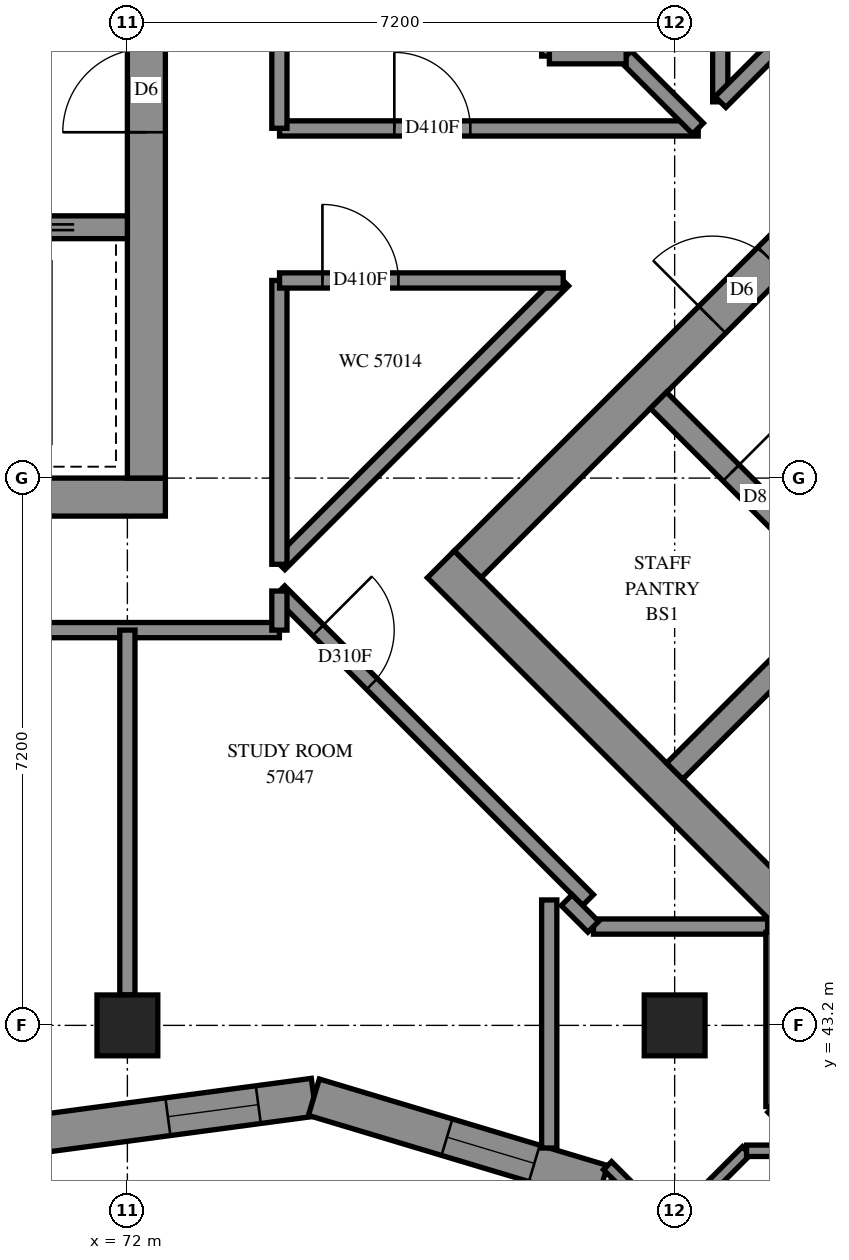
"""IFC4 building model, lengths in metres.
Left out: names, types, materials, properties, quantities, classifications, styles, units other than length and angle.
Written with IfcOpenShell. Run it as: python <this file> out.ifc"""

import sys

from ifc_helpers import new_model, si_unit, direction, frame, frame_2d, origin, origin_2d, place, context, subcontext, project, spatial, polyline, rectangle, outline, extrude, element, fill, save


model = new_model("IFC4")
c1 = context("Model", 3, precision=1e-05, world=origin(), true_north=direction((0.0, 1.0)))
c2 = subcontext(c1, "Body", "Model", "MODEL_VIEW")
j1 = project(units=[si_unit("LENGTHUNIT", "METRE"), si_unit("PLANEANGLEUNIT", "RADIAN")], contexts=[c1])
p1 = place(None, origin())
s1 = spatial("IfcSite", under=j1, at=p1, CompositionType="ELEMENT")
p2 = place(p1, origin())
s2 = spatial("IfcBuilding", under=s1, at=p2, CompositionType="ELEMENT")
p3 = place(p2, frame((0.0, 0.0, 210.0)))
s3 = spatial("IfcBuildingStorey", under=s2, at=p3, CompositionType="ELEMENT", Elevation=210.0)
for number, where, z_axis, x_axis in (
    (1, (72.0, 43.2, 0.0), (0.0, 0.0, 1.0), (1.0, 0.0, 0.0)),
    (2, (79.2, 43.2, 0.0), (0.0, 0.0, 1.0), (1.0, 0.0, 0.0)),
):
    element("IfcColumn", number, at=place(p3, frame(where, z_axis=z_axis, x_axis=x_axis)), inside=s3, PredefinedType="COLUMN", context=c2, shape_type="SweptSolid", body=[
        extrude(rectangle(XDim=0.8, YDim=0.8, at=origin_2d()), origin(), (0.0, 0.0, 1.0), 3.1),
    ])
p4 = place(p3, frame((57.1, 50.15, -0.3), z_axis=(0.0, 0.0, 1.0), x_axis=(1.0, 0.0, 0.0)))
e3 = element("IfcWall", 3, at=p4, inside=s3, PredefinedType="SHEAR", context=c2, shape_type="SweptSolid", body=[
    extrude(rectangle(XDim=15.4, YDim=0.5, at=frame_2d((7.7, 0.0))), origin(), (0.0, 0.0, 1.0), 2.7),
])
p5 = place(p3, frame((72.25, 50.4, -0.3), z_axis=(0.0, 0.0, 1.0), x_axis=(0.0, 1.0, 0.0)))
e4 = element("IfcWall", 4, at=p5, inside=s3, PredefinedType="SHEAR", context=c2, shape_type="SweptSolid", body=[
    extrude(rectangle(XDim=14.4, YDim=0.5, at=frame_2d((7.2, 0.0))), origin(), (0.0, 0.0, 1.0), 2.7),
])
p6 = place(p5, frame((4.55, 0.0, 0.3)))
e5 = element("IfcOpeningElement", 5, at=p6, cuts=e4, PredefinedType="OPENING", context=c2, shape_type="SweptSolid", body=[
    extrude(rectangle(XDim=1.1, YDim=2.1, at=frame_2d((0.55, 1.05))), frame((0.0, 0.26, 0.0), z_axis=(0.0, -1.0, 0.0), x_axis=(1.0, 0.0, 0.0)), (0.0, 0.0, 1.0), 0.52),
])
p7 = place(p5, frame((11.35, 0.0, 0.3)))
e6 = element("IfcOpeningElement", 6, at=p7, cuts=e4, PredefinedType="OPENING", context=c2, shape_type="SweptSolid", body=[
    extrude(rectangle(XDim=1.1, YDim=2.1, at=frame_2d((0.55, 1.05))), frame((0.0, 0.26, 0.0), z_axis=(0.0, -1.0, 0.0), x_axis=(1.0, 0.0, 0.0)), (0.0, 0.0, 1.0), 0.52),
])
p8 = place(p3, frame((57.6, 53.7, 0.0), z_axis=(0.0, 0.0, 1.0), x_axis=(1.0, 0.0, 0.0)))
e7 = element("IfcWall", 7, at=p8, inside=s3, PredefinedType="SOLIDWALL", context=c2, shape_type="SweptSolid", body=[
    extrude(rectangle(XDim=14.4, YDim=0.3, at=frame_2d((7.2, 0.0))), origin(), (0.0, 0.0, 1.0), 3.1),
])
p9 = place(p8, frame((1.35, 0.0, 0.0)))
e8 = element("IfcOpeningElement", 8, at=p9, cuts=e7, PredefinedType="OPENING", context=c2, shape_type="SweptSolid", body=[
    extrude(rectangle(XDim=0.9, YDim=2.1, at=frame_2d((0.45, 1.05))), frame((0.0, 0.16, 0.0), z_axis=(0.0, -1.0, 0.0), x_axis=(1.0, 0.0, 0.0)), (0.0, 0.0, 1.0), 0.32),
])
p10 = place(p8, frame((4.95, 0.0, 0.0)))
e9 = element("IfcOpeningElement", 9, at=p10, cuts=e7, PredefinedType="OPENING", context=c2, shape_type="SweptSolid", body=[
    extrude(rectangle(XDim=0.9, YDim=2.1, at=frame_2d((0.45, 1.05))), frame((0.0, 0.16, 0.0), z_axis=(0.0, -1.0, 0.0), x_axis=(1.0, 0.0, 0.0)), (0.0, 0.0, 1.0), 0.32),
])
p11 = place(p8, frame((8.55, 0.0, 0.0)))
e10 = element("IfcOpeningElement", 10, at=p11, cuts=e7, PredefinedType="OPENING", context=c2, shape_type="SweptSolid", body=[
    extrude(rectangle(XDim=0.9, YDim=2.1, at=frame_2d((0.45, 1.05))), frame((0.0, 0.16, 0.0), z_axis=(0.0, -1.0, 0.0), x_axis=(1.0, 0.0, 0.0)), (0.0, 0.0, 1.0), 0.32),
])
p12 = place(p8, frame((12.05, 0.0, 0.0)))
e11 = element("IfcOpeningElement", 11, at=p12, cuts=e7, PredefinedType="OPENING", context=c2, shape_type="SweptSolid", body=[
    extrude(rectangle(XDim=1.1, YDim=2.1, at=frame_2d((0.55, 1.05))), frame((0.0, 0.16, 0.0), z_axis=(0.0, -1.0, 0.0), x_axis=(1.0, 0.0, 0.0)), (0.0, 0.0, 1.0), 0.32),
])
p13 = place(p3, frame((76.124, 49.267, -0.3), z_axis=(0.0, 0.0, 1.0), x_axis=(0.7071067812, -0.7071067812, 0.0)))
e12 = element("IfcWall", 12, at=p13, inside=s3, PredefinedType="SHEAR", context=c2, shape_type="SweptSolid", body=[
    extrude(rectangle(XDim=15.4, YDim=0.5, at=frame_2d((7.7, 0.0))), origin(), (0.0, 0.0, 1.0), 2.7),
])
p14 = place(p3, frame((76.478, 49.267, -0.3), z_axis=(0.0, 0.0, 1.0), x_axis=(0.7071067812, 0.7071067812, 0.0)))
e13 = element("IfcWall", 13, at=p14, inside=s3, PredefinedType="SHEAR", context=c2, shape_type="SweptSolid", body=[
    extrude(rectangle(XDim=14.4, YDim=0.5, at=frame_2d((7.2, 0.0))), origin(), (0.0, 0.0, 1.0), 2.7),
])
p15 = place(p14, frame((4.55, 0.0, 0.3)))
e14 = element("IfcOpeningElement", 14, at=p15, cuts=e13, PredefinedType="OPENING", context=c2, shape_type="SweptSolid", body=[
    extrude(rectangle(XDim=1.1, YDim=2.1, at=frame_2d((0.55, 1.05))), frame((0.0, 0.26, 0.0), z_axis=(0.0, -1.0, 0.0), x_axis=(1.0, 0.0, 0.0)), (0.0, 0.0, 1.0), 0.52),
])
p16 = place(p14, frame((11.35, 0.0, 0.3)))
e15 = element("IfcOpeningElement", 15, at=p16, cuts=e13, PredefinedType="OPENING", context=c2, shape_type="SweptSolid", body=[
    extrude(rectangle(XDim=1.1, YDim=2.1, at=frame_2d((0.55, 1.05))), frame((0.0, 0.26, 0.0), z_axis=(0.0, -1.0, 0.0), x_axis=(1.0, 0.0, 0.0)), (0.0, 0.0, 1.0), 0.52),
])
p17 = place(p3, frame((79.2, 46.544, 0.0), z_axis=(0.0, 0.0, 1.0), x_axis=(0.7071219326, 0.7070916295, 0.0)))
e16 = element("IfcWall", 16, at=p17, inside=s3, PredefinedType="SOLIDWALL", context=c2, shape_type="SweptSolid", body=[
    extrude(rectangle(XDim=3.3, YDim=0.3, at=frame_2d((1.65, 0.0))), origin(), (0.0, 0.0, 1.0), 3.1),
])
p18 = place(p3, frame((78.988, 51.423, 0.0), z_axis=(0.0, 0.0, 1.0), x_axis=(0.7071067812, -0.7071067812, 0.0)))
e17 = element("IfcWall", 17, at=p18, inside=s3, PredefinedType="SOLIDWALL", context=c2, shape_type="SweptSolid", body=[
    extrude(rectangle(XDim=14.4, YDim=0.3, at=frame_2d((7.2, 0.0))), origin(), (0.0, 0.0, 1.0), 3.1),
])
p19 = place(p18, frame((1.35, 0.0, 0.0)))
e18 = element("IfcOpeningElement", 18, at=p19, cuts=e17, PredefinedType="OPENING", context=c2, shape_type="SweptSolid", body=[
    extrude(rectangle(XDim=0.9, YDim=2.1, at=frame_2d((0.45, 1.05))), frame((0.0, 0.16, 0.0), z_axis=(0.0, -1.0, 0.0), x_axis=(1.0, 0.0, 0.0)), (0.0, 0.0, 1.0), 0.32),
])
p20 = place(p18, frame((4.95, 0.0, 0.0)))
e19 = element("IfcOpeningElement", 19, at=p20, cuts=e17, PredefinedType="OPENING", context=c2, shape_type="SweptSolid", body=[
    extrude(rectangle(XDim=0.9, YDim=2.1, at=frame_2d((0.45, 1.05))), frame((0.0, 0.16, 0.0), z_axis=(0.0, -1.0, 0.0), x_axis=(1.0, 0.0, 0.0)), (0.0, 0.0, 1.0), 0.32),
])
p21 = place(p18, frame((8.55, 0.0, 0.0)))
e20 = element("IfcOpeningElement", 20, at=p21, cuts=e17, PredefinedType="OPENING", context=c2, shape_type="SweptSolid", body=[
    extrude(rectangle(XDim=0.9, YDim=2.1, at=frame_2d((0.45, 1.05))), frame((0.0, 0.16, 0.0), z_axis=(0.0, -1.0, 0.0), x_axis=(1.0, 0.0, 0.0)), (0.0, 0.0, 1.0), 0.32),
])
p22 = place(p18, frame((12.05, 0.0, 0.0)))
e21 = element("IfcOpeningElement", 21, at=p22, cuts=e17, PredefinedType="OPENING", context=c2, shape_type="SweptSolid", body=[
    extrude(rectangle(XDim=1.1, YDim=2.1, at=frame_2d((0.55, 1.05))), frame((0.0, 0.16, 0.0), z_axis=(0.0, -1.0, 0.0), x_axis=(1.0, 0.0, 0.0)), (0.0, 0.0, 1.0), 0.32),
])
p23 = place(p3, frame((70.828, 41.77, 0.0), z_axis=(0.0, 0.0, 1.0), x_axis=(0.9911788782, 0.1325308696, 0.0)))
e22 = element("IfcWall", 22, at=p23, inside=s3, PredefinedType="SOLIDWALL", context=c2, shape_type="SweptSolid", body=[
    extrude(outline(polyline([(-0.033, -0.25), (3.603, -0.25), (3.711, 0.25), (0.033, 0.25), (-0.033, -0.25)])), origin(), (0.0, 0.0, 1.0), 3.1),
])
p24 = place(p23, frame((1.72, 0.0, 0.45)))
e23 = element("IfcOpeningElement", 23, at=p24, cuts=e22, PredefinedType="OPENING", context=c2, shape_type="SweptSolid", body=[
    extrude(rectangle(XDim=1.2, YDim=2.5, at=frame_2d((0.6, 1.25))), frame((0.0, 0.26, 0.0), z_axis=(0.0, -1.0, 0.0), x_axis=(1.0, 0.0, 0.0)), (0.0, 0.0, 1.0), 0.52),
])
p25 = place(p3, frame((74.453, 42.255, 0.0), z_axis=(0.0, 0.0, 1.0), x_axis=(0.9577859598, -0.2874822693, 0.0)))
e24 = element("IfcWall", 24, at=p25, inside=s3, PredefinedType="SOLIDWALL", context=c2, shape_type="SweptSolid", body=[
    extrude(outline(polyline([(0.054, -0.25), (3.817, -0.25), (4.101, 0.25), (-0.054, 0.25), (0.054, -0.25)])), origin(), (0.0, 0.0, 1.0), 3.1),
])
p26 = place(p25, frame((1.828, 0.0, 0.45)))
e25 = element("IfcOpeningElement", 25, at=p26, cuts=e24, PredefinedType="OPENING", context=c2, shape_type="SweptSolid", body=[
    extrude(rectangle(XDim=1.2, YDim=2.5, at=frame_2d((0.6, 1.25))), frame((0.0, 0.26, 0.0), z_axis=(0.0, -1.0, 0.0), x_axis=(1.0, 0.0, 0.0)), (0.0, 0.0, 1.0), 0.52),
])
p27 = place(p3, frame((78.246, 41.117, 0.0), z_axis=(0.0, 0.0, 1.0), x_axis=(0.2436885681, -0.9698535363, 0.0)))
e26 = element("IfcWall", 26, at=p27, inside=s3, PredefinedType="SOLIDWALL", context=c2, shape_type="SweptSolid", body=[
    extrude(outline(polyline([(0.142, -0.25), (4.816, -0.25), (4.529, 0.25), (-0.142, 0.25), (0.142, -0.25)])), origin(), (0.0, 0.0, 1.0), 3.1),
])
p28 = place(p27, frame((1.947, 0.0, 0.45)))
e27 = element("IfcOpeningElement", 27, at=p28, cuts=e26, PredefinedType="OPENING", context=c2, shape_type="SweptSolid", body=[
    extrude(rectangle(XDim=1.2, YDim=2.5, at=frame_2d((0.6, 1.25))), frame((0.0, 0.26, 0.0), z_axis=(0.0, -1.0, 0.0), x_axis=(1.0, 0.0, 0.0)), (0.0, 0.0, 1.0), 0.52),
])
p29 = place(p3, frame((55.6, 48.4, 0.0), z_axis=(0.0, 0.0, 1.0), x_axis=(1.0, 0.0, 0.0)))
e28 = element("IfcWall", 28, at=p29, inside=s3, PredefinedType="PARTITIONING", context=c2, shape_type="SweptSolid", body=[
    extrude(rectangle(XDim=18.4, YDim=0.2, at=frame_2d((9.2, 0.0))), origin(), (0.0, 0.0, 1.0), 3.1),
])
p30 = place(p29, frame((5.862, 0.0, 0.0)))
e29 = element("IfcOpeningElement", 29, at=p30, cuts=e28, PredefinedType="OPENING", context=c2, shape_type="SweptSolid", body=[
    extrude(rectangle(XDim=1.0, YDim=2.1, at=frame_2d((0.5, 1.05))), frame((0.0, 0.11, 0.0), z_axis=(0.0, -1.0, 0.0), x_axis=(1.0, 0.0, 0.0)), (0.0, 0.0, 1.0), 0.22),
])
p31 = place(p29, frame((13.099, 0.0, 0.0)))
e30 = element("IfcOpeningElement", 30, at=p31, cuts=e28, PredefinedType="OPENING", context=c2, shape_type="SweptSolid", body=[
    extrude(rectangle(XDim=0.9, YDim=2.1, at=frame_2d((0.45, 1.05))), frame((0.0, 0.11, 0.0), z_axis=(0.0, -1.0, 0.0), x_axis=(1.0, 0.0, 0.0)), (0.0, 0.0, 1.0), 0.22),
])
p32 = place(p3, frame((73.999, 48.911, 0.0), z_axis=(0.0, 0.0, 1.0), x_axis=(0.7071067812, -0.7071067812, 0.0)))
e31 = element("IfcWall", 31, at=p32, inside=s3, PredefinedType="PARTITIONING", context=c2, shape_type="SweptSolid", body=[
    extrude(rectangle(XDim=5.745, YDim=0.2, at=frame_2d((2.872, 0.0))), origin(), (0.0, 0.0, 1.0), 3.1),
])
p33 = place(p32, frame((0.724, 0.0, 0.0)))
e32 = element("IfcOpeningElement", 32, at=p33, cuts=e31, PredefinedType="OPENING", context=c2, shape_type="SweptSolid", body=[
    extrude(rectangle(XDim=1.0, YDim=2.1, at=frame_2d((0.5, 1.05))), frame((0.0, 0.11, 0.0), z_axis=(0.0, -1.0, 0.0), x_axis=(1.0, 0.0, 0.0)), (0.0, 0.0, 1.0), 0.22),
])
p34 = place(p3, frame((74.002, 55.0, 0.0), z_axis=(0.0, 0.0, 1.0), x_axis=(1.0, 0.0, 0.0)))
e33 = element("IfcWall", 33, at=p34, inside=s3, PredefinedType="PARTITIONING", context=c2, shape_type="SweptSolid", body=[
    extrude(rectangle(XDim=5.508, YDim=0.2, at=frame_2d((2.754, 0.0))), origin(), (0.0, 0.0, 1.0), 3.1),
])
p35 = place(p34, frame((1.51, 0.0, 0.0)))
e34 = element("IfcOpeningElement", 34, at=p35, cuts=e33, PredefinedType="OPENING", context=c2, shape_type="SweptSolid", body=[
    extrude(rectangle(XDim=1.0, YDim=2.1, at=frame_2d((0.5, 1.05))), frame((0.0, 0.11, 0.0), z_axis=(0.0, -1.0, 0.0), x_axis=(1.0, 0.0, 0.0)), (0.0, 0.0, 1.0), 0.22),
])
p36 = place(p3, frame((74.0, 55.002, 0.0), z_axis=(0.0, 0.0, 1.0), x_axis=(0.0, 1.0, 0.0)))
e35 = element("IfcWall", 35, at=p36, inside=s3, PredefinedType="PARTITIONING", context=c2, shape_type="SweptSolid", body=[
    extrude(rectangle(XDim=5.508, YDim=0.2, at=frame_2d((2.754, 0.0))), origin(), (0.0, 0.0, 1.0), 3.1),
])
p37 = place(p3, frame((74.001, 49.267, 0.0), z_axis=(0.0, 0.0, 1.0), x_axis=(0.7071067812, 0.7071067812, 0.0)))
e36 = element("IfcWall", 36, at=p37, inside=s3, PredefinedType="PARTITIONING", context=c2, shape_type="SweptSolid", body=[
    extrude(rectangle(XDim=5.278, YDim=0.2, at=frame_2d((2.639, 0.0))), origin(), (0.0, 0.0, 1.0), 3.1),
])
p38 = place(p3, frame((72.0, 43.6, 0.0), z_axis=(0.0, 0.0, 1.0), x_axis=(0.0, 1.0, 0.0)))
e37 = element("IfcWall", 37, at=p38, inside=s3, PredefinedType="PARTITIONING", context=c2, shape_type="SweptSolid", body=[
    extrude(rectangle(XDim=4.8, YDim=0.2, at=frame_2d((2.4, 0.0))), origin(), (0.0, 0.0, 1.0), 3.1),
])
p39 = place(p3, frame((79.8, 55.35, 0.0), z_axis=(0.0, 0.0, 1.0), x_axis=(0.0, 1.0, 0.0)))
e38 = element("IfcWall", 38, at=p39, inside=s3, PredefinedType="PARTITIONING", context=c2, shape_type="SweptSolid", body=[
    extrude(rectangle(XDim=3.9, YDim=0.2, at=frame_2d((1.95, 0.0))), origin(), (0.0, 0.0, 1.0), 3.1),
])
p40 = place(p3, frame((74.0, 49.266, 0.0), z_axis=(0.0, 0.0, 1.0), x_axis=(0.0, 1.0, 0.0)))
e39 = element("IfcWall", 39, at=p40, inside=s3, PredefinedType="PARTITIONING", context=c2, shape_type="SweptSolid", body=[
    extrude(rectangle(XDim=3.734, YDim=0.2, at=frame_2d((1.867, 0.0))), origin(), (0.0, 0.0, 1.0), 3.1),
])
p41 = place(p3, frame((74.002, 53.0, 0.0), z_axis=(0.0, 0.0, 1.0), x_axis=(1.0, 0.0, 0.0)))
e40 = element("IfcWall", 40, at=p41, inside=s3, PredefinedType="PARTITIONING", context=c2, shape_type="SweptSolid", body=[
    extrude(rectangle(XDim=3.732, YDim=0.2, at=frame_2d((1.866, 0.0))), origin(), (0.0, 0.0, 1.0), 3.1),
])
p42 = place(p41, frame((0.564, 0.0, 0.0)))
e41 = element("IfcOpeningElement", 41, at=p42, cuts=e40, PredefinedType="OPENING", context=c2, shape_type="SweptSolid", body=[
    extrude(rectangle(XDim=1.0, YDim=2.1, at=frame_2d((0.5, 1.05))), frame((0.0, 0.11, 0.0), z_axis=(0.0, -1.0, 0.0), x_axis=(1.0, 0.0, 0.0)), (0.0, 0.0, 1.0), 0.22),
])
p43 = place(p3, frame((77.55, 41.587, 0.0), z_axis=(0.0, 0.0, 1.0), x_axis=(0.0, 1.0, 0.0)))
e42 = element("IfcWall", 42, at=p43, inside=s3, PredefinedType="PARTITIONING", context=c2, shape_type="SweptSolid", body=[
    extrude(rectangle(XDim=3.264, YDim=0.2, at=frame_2d((1.632, 0.0))), origin(), (0.0, 0.0, 1.0), 3.1),
])
p44 = place(p3, frame((78.317, 41.354, 0.0), z_axis=(0.0, 0.0, 1.0), x_axis=(0.7065991024, -0.7076140958, 0.0)))
e43 = element("IfcWall", 43, at=p44, inside=s3, PredefinedType="PARTITIONING", context=c2, shape_type="SweptSolid", body=[
    extrude(rectangle(XDim=3.054, YDim=0.15, at=frame_2d((1.527, 0.0))), origin(), (0.0, 0.0, 1.0), 3.1),
])
for number, where, z_axis, x_axis in (
    (44, (78.132, 44.5, 0.0), (0.0, 0.0, 1.0), (1.0, 0.0, 0.0)),
    (45, (80.5, 42.132, 0.0), (0.0, 0.0, 1.0), (0.0, 1.0, 0.0)),
):
    element("IfcWall", number, at=place(p3, frame(where, z_axis=z_axis, x_axis=x_axis)), inside=s3, PredefinedType="PARTITIONING", context=c2, shape_type="SweptSolid", body=[
        extrude(rectangle(XDim=2.292, YDim=0.2, at=frame_2d((1.146, 0.0))), origin(), (0.0, 0.0, 1.0), 3.1),
    ])
p45 = place(p3, frame((78.746, 40.152, 0.0), z_axis=(0.0, 0.0, 1.0), x_axis=(0.7070815098, 0.7071320517, 0.0)))
e46 = element("IfcWall", 46, at=p45, inside=s3, PredefinedType="PARTITIONING", context=c2, shape_type="SweptSolid", body=[
    extrude(rectangle(XDim=1.979, YDim=0.15, at=frame_2d((0.989, 0.0))), origin(), (0.0, 0.0, 1.0), 3.1),
])
p46 = place(p3, frame((79.803, 55.347, 0.0), z_axis=(0.0, 0.0, 1.0), x_axis=(0.706460727, 0.7077522457, 0.0)))
e47 = element("IfcWall", 47, at=p46, inside=s3, PredefinedType="PARTITIONING", context=c2, shape_type="SweptSolid", body=[
    extrude(rectangle(XDim=1.549, YDim=0.2, at=frame_2d((0.774, 0.0))), origin(), (0.0, 0.0, 1.0), 3.1),
])
p47 = place(p3, frame((78.559, 55.947, 0.0), z_axis=(0.0, 0.0, 1.0), x_axis=(0.7071067812, -0.7071067812, 0.0)))
e48 = element("IfcWall", 48, at=p47, inside=s3, PredefinedType="PARTITIONING", context=c2, shape_type="SweptSolid", body=[
    extrude(rectangle(XDim=1.341, YDim=0.2, at=frame_2d((0.67, 0.0))), origin(), (0.0, 0.0, 1.0), 3.1),
])
for number, where, z_axis, x_axis in (
    (49, (77.55, 55.952, 0.0), (0.0, 0.0, 1.0), (0.0, 1.0, 0.0)),
    (50, (77.552, 55.95, 0.0), (0.0, 0.0, 1.0), (1.0, 0.0, 0.0)),
):
    element("IfcWall", number, at=place(p3, frame(where, z_axis=z_axis, x_axis=x_axis)), inside=s3, PredefinedType="PARTITIONING", context=c2, shape_type="SweptSolid", body=[
        extrude(rectangle(XDim=1.01, YDim=0.2, at=frame_2d((0.505, 0.0))), origin(), (0.0, 0.0, 1.0), 3.1),
    ])
p48 = place(p3, frame((80.146, 41.55, 0.0), z_axis=(0.0, 0.0, 1.0), x_axis=(1.0, 0.0, 0.0)))
e51 = element("IfcWall", 51, at=p48, inside=s3, PredefinedType="PARTITIONING", context=c2, shape_type="SweptSolid", body=[
    extrude(rectangle(XDim=0.702, YDim=0.15, at=frame_2d((0.351, 0.0))), origin(), (0.0, 0.0, 1.0), 3.1),
])
p49 = place(p3, frame((74.0, 48.4, 0.0), z_axis=(0.0, 0.0, 1.0), x_axis=(0.0, 1.0, 0.0)))
e52 = element("IfcWall", 52, at=p49, inside=s3, PredefinedType="PARTITIONING", context=c2, shape_type="SweptSolid", body=[
    extrude(rectangle(XDim=0.514, YDim=0.2, at=frame_2d((0.257, 0.0))), origin(), (0.0, 0.0, 1.0), 3.1),
])
for number, where, z_axis, x_axis in (
    (53, (77.779, 44.847, 0.0), (0.0, 0.0, 1.0), (0.707, -0.707, 0.0)),
    (54, (80.497, 42.129, 0.0), (0.0, 0.0, 1.0), (0.707, -0.707, 0.0)),
):
    element("IfcWall", number, at=place(p3, frame(where, z_axis=z_axis, x_axis=x_axis)), inside=s3, PredefinedType="PARTITIONING", context=c2, shape_type="SweptSolid", body=[
        extrude(rectangle(XDim=0.495, YDim=0.2, at=frame_2d((0.247, 0.0))), origin(), (0.0, 0.0, 1.0), 3.1),
    ])
p50 = place(p24, origin())
e55 = element("IfcWindow", 55, at=p50, inside=s3, PartitioningType="SINGLE_PANEL", PredefinedType="WINDOW", context=c2, shape_type="SweptSolid", body=[
    extrude(rectangle(XDim=1.2, YDim=2.5, at=frame_2d((0.6, 1.25))), frame((0.0, 0.18, 0.0), z_axis=(0.0, -1.0, 0.0), x_axis=(1.0, 0.0, 0.0)), (0.0, 0.0, 1.0), 0.06),
])
fill(e23, e55)
p51 = place(p26, origin())
e56 = element("IfcWindow", 56, at=p51, inside=s3, PartitioningType="SINGLE_PANEL", PredefinedType="WINDOW", context=c2, shape_type="SweptSolid", body=[
    extrude(rectangle(XDim=1.2, YDim=2.5, at=frame_2d((0.6, 1.25))), frame((0.0, 0.18, 0.0), z_axis=(0.0, -1.0, 0.0), x_axis=(1.0, 0.0, 0.0)), (0.0, 0.0, 1.0), 0.06),
])
fill(e25, e56)
p52 = place(p6, origin())
e57 = element("IfcDoor", 57, at=p52, inside=s3, OperationType="DOUBLE_DOOR_SINGLE_SWING", PredefinedType="DOOR", context=c2, shape_type="SweptSolid", body=[
    extrude(rectangle(XDim=1.1, YDim=2.1, at=frame_2d((0.55, 1.05))), frame((0.0, 0.025, 0.0), z_axis=(0.0, -1.0, 0.0), x_axis=(1.0, 0.0, 0.0)), (0.0, 0.0, 1.0), 0.05),
])
fill(e5, e57)
p53 = place(p15, origin())
e58 = element("IfcDoor", 58, at=p53, inside=s3, OperationType="DOUBLE_DOOR_SINGLE_SWING", PredefinedType="DOOR", context=c2, shape_type="SweptSolid", body=[
    extrude(rectangle(XDim=1.1, YDim=2.1, at=frame_2d((0.55, 1.05))), frame((0.0, 0.025, 0.0), z_axis=(0.0, -1.0, 0.0), x_axis=(1.0, 0.0, 0.0)), (0.0, 0.0, 1.0), 0.05),
])
fill(e14, e58)
p54 = place(p19, origin())
e59 = element("IfcDoor", 59, at=p54, inside=s3, OperationType="SINGLE_SWING_LEFT", PredefinedType="DOOR", context=c2, shape_type="SweptSolid", body=[
    extrude(rectangle(XDim=0.9, YDim=2.1, at=frame_2d((0.45, 1.05))), frame((0.0, 0.025, 0.0), z_axis=(0.0, -1.0, 0.0), x_axis=(1.0, 0.0, 0.0)), (0.0, 0.0, 1.0), 0.05),
])
fill(e18, e59)
p55 = place(p42, origin())
e60 = element("IfcDoor", 60, at=p55, inside=s3, OperationType="SINGLE_SWING_RIGHT", PredefinedType="DOOR", context=c2, shape_type="SweptSolid", body=[
    extrude(rectangle(XDim=1.0, YDim=2.1, at=frame_2d((0.5, 1.05))), frame((0.0, 0.025, 0.0), z_axis=(0.0, -1.0, 0.0), x_axis=(1.0, 0.0, 0.0)), (0.0, 0.0, 1.0), 0.05),
])
fill(e41, e60)
p56 = place(p33, origin())
e61 = element("IfcDoor", 61, at=p56, inside=s3, OperationType="SINGLE_SWING_LEFT", PredefinedType="DOOR", context=c2, shape_type="SweptSolid", body=[
    extrude(rectangle(XDim=1.0, YDim=2.1, at=frame_2d((0.5, 1.05))), frame((0.0, 0.025, 0.0), z_axis=(0.0, -1.0, 0.0), x_axis=(1.0, 0.0, 0.0)), (0.0, 0.0, 1.0), 0.05),
])
fill(e32, e61)
p57 = place(p35, origin())
e62 = element("IfcDoor", 62, at=p57, inside=s3, OperationType="SINGLE_SWING_LEFT", PredefinedType="DOOR", context=c2, shape_type="SweptSolid", body=[
    extrude(rectangle(XDim=1.0, YDim=2.1, at=frame_2d((0.5, 1.05))), frame((0.0, 0.025, 0.0), z_axis=(0.0, -1.0, 0.0), x_axis=(1.0, 0.0, 0.0)), (0.0, 0.0, 1.0), 0.05),
])
fill(e34, e62)
save(model, sys.argv[1])
